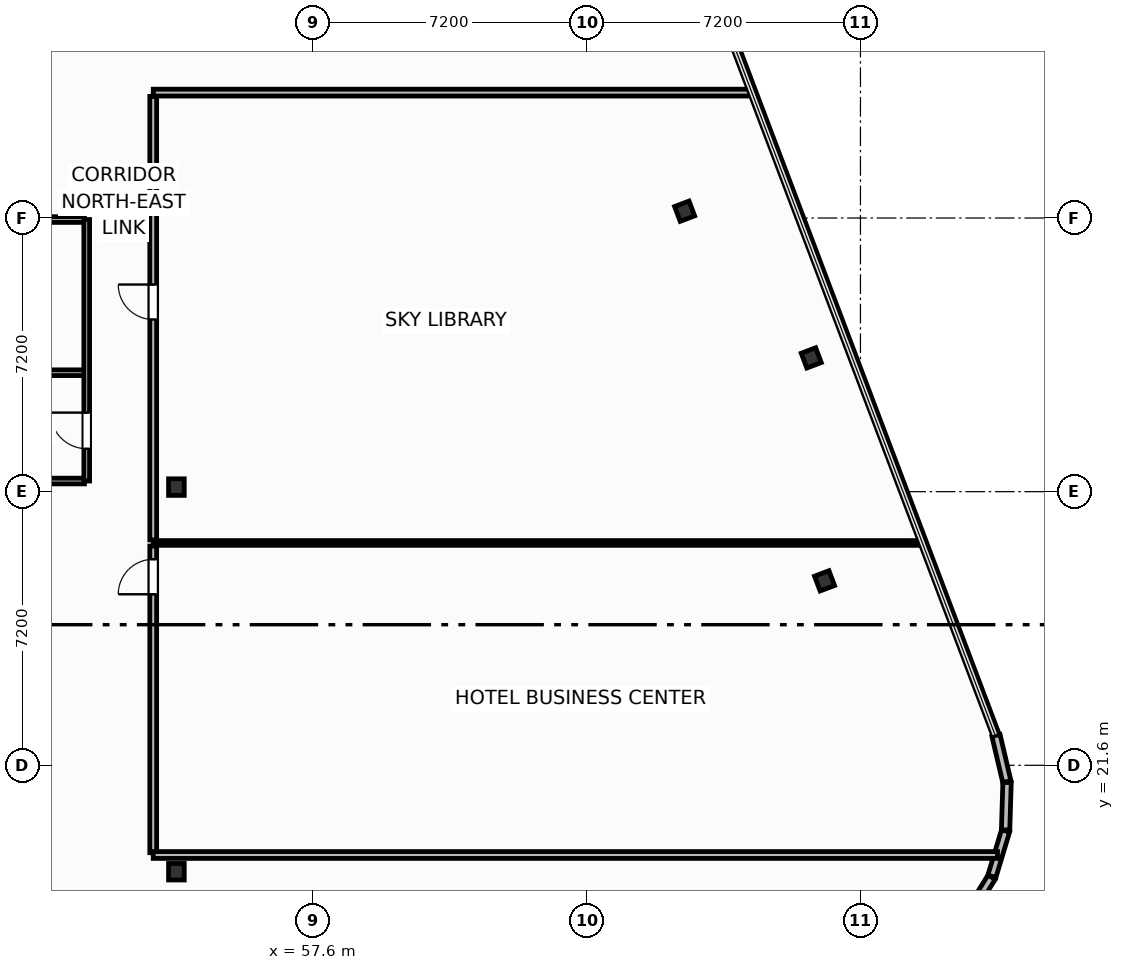
"""IFC4 building model, lengths in metres.
Left out: names, types, materials, properties, quantities, classifications, styles, units other than length and angle.
Written with IfcOpenShell. Run it as: python <this file> out.ifc"""

import sys

from ifc_helpers import new_model, si_unit, direction, frame, frame_2d, origin, origin_2d, place, context, subcontext, project, spatial, rectangle, i_section, extrude, element, fill, save


model = new_model("IFC4")
c1 = context("Model", 3, precision=1e-05, world=origin(), true_north=direction((0.0, 1.0)))
c2 = subcontext(c1, "Body", "Model", "MODEL_VIEW")
j1 = project(units=[si_unit("LENGTHUNIT", "METRE"), si_unit("PLANEANGLEUNIT", "RADIAN")], contexts=[c1])
p1 = place(None, origin())
s1 = spatial("IfcSite", under=j1, at=p1, CompositionType="ELEMENT")
p2 = place(p1, origin())
s2 = spatial("IfcBuilding", under=s1, at=p2, CompositionType="ELEMENT")
p3 = place(p2, frame((0.0, 0.0, 223.8)))
s3 = spatial("IfcBuildingStorey", under=s2, at=p3, CompositionType="ELEMENT", Elevation=223.8)
for number, where, z_axis, x_axis in (
    (1, (54.0, 18.8, 0.0), (0.0, 0.0, 1.0), (1.0, 0.0, 0.0)),
    (2, (54.0, 28.92, 0.0), (0.0, 0.0, 1.0), (1.0, 0.0, 0.0)),
):
    element("IfcColumn", number, at=place(p3, frame(where, z_axis=z_axis, x_axis=x_axis)), inside=s3, PredefinedType="COLUMN", context=c2, shape_type="SweptSolid", body=[
        extrude(i_section(OverallWidth=0.412, OverallDepth=0.435, WebThickness=0.036, FlangeThickness=0.057, FilletRadius=0.025, at=origin_2d()), origin(), (0.0, 0.0, 1.0), 3.7),
    ])
for number, where, z_axis, x_axis in (
    (3, (71.055, 26.453, 0.0), (0.0, 0.0, 1.0), (0.935, 0.354, 0.0)),
    (4, (70.706, 32.32, 0.0), (0.0, 0.0, 1.0), (0.935, 0.354, 0.0)),
    (5, (67.373, 36.18, 0.0), (0.0, 0.0, 1.0), (0.935, 0.354, 0.0)),
):
    element("IfcColumn", number, at=place(p3, frame(where, z_axis=z_axis, x_axis=x_axis)), inside=s3, PredefinedType="COLUMN", context=c2, shape_type="SweptSolid", body=[
        extrude(i_section(OverallWidth=0.406, OverallDepth=0.416, WebThickness=0.03, FlangeThickness=0.048, FilletRadius=0.025, at=origin_2d()), origin(), (0.0, 0.0, 1.0), 3.7),
    ])
for number, where, z_axis, x_axis in (
    (6, (74.794, 17.593, 0.0), (0.0, 0.0, 1.0), (0.527, 0.85, 0.0)),
    (7, (75.458, 18.679, 0.0), (0.0, 0.0, 1.0), (0.288, 0.958, 0.0)),
):
    element("IfcWall", number, at=place(p3, frame(where, z_axis=z_axis, x_axis=x_axis)), inside=s3, PredefinedType="SOLIDWALL", context=c2, shape_type="SweptSolid", body=[
        extrude(rectangle(XDim=1.249, YDim=0.22, at=frame_2d((0.624, 0.0))), origin(), (0.0, 0.0, 1.0), 2.73),
    ])
p4 = place(p3, frame((75.819, 19.899, 0.0), z_axis=(0.0, 0.0, 1.0), x_axis=(0.030898954628, 0.999522513305, 0.0)))
e8 = element("IfcWall", 8, at=p4, inside=s3, PredefinedType="SOLIDWALL", context=c2, shape_type="SweptSolid", body=[
    extrude(rectangle(XDim=1.248, YDim=0.22, at=frame_2d((0.624, 0.0))), origin(), (0.0, 0.0, 1.0), 2.73),
])
p5 = place(p3, frame((75.852, 21.172, 0.0), z_axis=(0.0, 0.0, 1.0), x_axis=(-0.228941257463, 0.973440239887, 0.0)))
e9 = element("IfcWall", 9, at=p5, inside=s3, PredefinedType="SOLIDWALL", context=c2, shape_type="SweptSolid", body=[
    extrude(rectangle(XDim=1.249, YDim=0.22, at=frame_2d((0.625, 0.0))), origin(), (0.0, 0.0, 1.0), 2.73),
])
p6 = place(p3, frame((53.39, 19.3, 0.0), z_axis=(0.0, 0.0, 1.0), x_axis=(0.0, 1.0, 0.0)))
e10 = element("IfcWall", 10, at=p6, inside=s3, PredefinedType="PARTITIONING", context=c2, shape_type="SweptSolid", body=[
    extrude(rectangle(XDim=8.07, YDim=0.18, at=frame_2d((4.035, 0.0))), origin(), (0.0, 0.0, 1.0), 3.45),
])
p7 = place(p6, frame((6.8, 0.0, 0.0)))
e11 = element("IfcOpeningElement", 11, at=p7, cuts=e10, PredefinedType="OPENING", context=c2, shape_type="SweptSolid", body=[
    extrude(rectangle(XDim=0.92, YDim=2.05, at=frame_2d((0.46, 1.025))), frame((0.0, 0.1, 0.0), z_axis=(0.0, -1.0, 0.0), x_axis=(1.0, 0.0, 0.0)), (0.0, 0.0, 1.0), 0.2),
])
p8 = place(p3, frame((53.39, 27.53, 0.0), z_axis=(0.0, 0.0, 1.0), x_axis=(0.0, 1.0, 0.0)))
e12 = element("IfcWall", 12, at=p8, inside=s3, PredefinedType="PARTITIONING", context=c2, shape_type="SweptSolid", body=[
    extrude(rectangle(XDim=11.67, YDim=0.18, at=frame_2d((5.835, 0.0))), origin(), (0.0, 0.0, 1.0), 3.45),
])
p9 = place(p8, frame((5.8, 0.0, 0.0)))
e13 = element("IfcOpeningElement", 13, at=p9, cuts=e12, PredefinedType="OPENING", context=c2, shape_type="SweptSolid", body=[
    extrude(rectangle(XDim=0.92, YDim=2.05, at=frame_2d((0.46, 1.025))), frame((0.0, 0.1, 0.0), z_axis=(0.0, -1.0, 0.0), x_axis=(1.0, 0.0, 0.0)), (0.0, 0.0, 1.0), 0.2),
])
p10 = place(p3, frame((53.39, 27.45, 0.0), z_axis=(0.0, 0.0, 1.0), x_axis=(1.0, 0.0, 0.0)))
e14 = element("IfcWall", 14, at=p10, inside=s3, PredefinedType="PARTITIONING", context=c2, shape_type="SweptSolid", body=[
    extrude(rectangle(XDim=20.199, YDim=0.125, at=frame_2d((10.1, 0.0))), origin(), (0.0, 0.0, 1.0), 2.739),
])
p11 = place(p3, frame((53.39, 19.24, 0.0), z_axis=(0.0, 0.0, 1.0), x_axis=(1.0, 0.0, 0.0)))
e15 = element("IfcWall", 15, at=p11, inside=s3, PredefinedType="PARTITIONING", context=c2, shape_type="SweptSolid", body=[
    extrude(rectangle(XDim=22.217, YDim=0.18, at=frame_2d((11.108, 0.0))), origin(), (0.0, 0.0, 1.0), 3.45),
])
p12 = place(p3, frame((53.39, 39.3, 0.0), z_axis=(0.0, 0.0, 1.0), x_axis=(1.0, 0.0, 0.0)))
e16 = element("IfcWall", 16, at=p12, inside=s3, PredefinedType="PARTITIONING", context=c2, shape_type="SweptSolid", body=[
    extrude(rectangle(XDim=15.713, YDim=0.18, at=frame_2d((7.856, 0.0))), origin(), (0.0, 0.0, 1.0), 3.45),
])
p13 = place(p3, frame((48.3, 31.93, 0.0), z_axis=(0.0, 0.0, 1.0), x_axis=(1.0, 0.0, 0.0)))
e17 = element("IfcWall", 17, at=p13, inside=s3, PredefinedType="PARTITIONING", context=c2, shape_type="SweptSolid", body=[
    extrude(rectangle(XDim=3.28, YDim=0.15, at=frame_2d((1.64, 0.0))), origin(), (0.0, 0.0, 1.0), 3.45),
])
p14 = place(p13, frame((1.15, 0.0, 0.0)))
e18 = element("IfcOpeningElement", 18, at=p14, cuts=e17, PredefinedType="OPENING", context=c2, shape_type="SweptSolid", body=[
    extrude(rectangle(XDim=0.95, YDim=2.05, at=frame_2d((0.475, 1.025))), frame((0.0, 0.085, 0.0), z_axis=(0.0, -1.0, 0.0), x_axis=(1.0, 0.0, 0.0)), (0.0, 0.0, 1.0), 0.17),
])
p15 = place(p3, frame((48.3, 29.08, 0.0), z_axis=(0.0, 0.0, 1.0), x_axis=(1.0, 0.0, 0.0)))
e19 = element("IfcWall", 19, at=p15, inside=s3, PredefinedType="PARTITIONING", context=c2, shape_type="SweptSolid", body=[
    extrude(rectangle(XDim=3.28, YDim=0.15, at=frame_2d((1.64, 0.0))), origin(), (0.0, 0.0, 1.0), 2.662),
])
p16 = place(p3, frame((48.3, 35.96, 0.0), z_axis=(0.0, 0.0, 1.0), x_axis=(1.0, 0.0, 0.0)))
e20 = element("IfcWall", 20, at=p16, inside=s3, PredefinedType="PARTITIONING", context=c2, shape_type="SweptSolid", body=[
    extrude(rectangle(XDim=3.28, YDim=0.15, at=frame_2d((1.64, 0.0))), origin(), (0.0, 0.0, 1.0), 3.45),
])
p17 = place(p3, frame((51.64, 29.08, 0.0), z_axis=(0.0, 0.0, 1.0), x_axis=(0.0, 1.0, 0.0)))
e21 = element("IfcWall", 21, at=p17, inside=s3, PredefinedType="PARTITIONING", context=c2, shape_type="SweptSolid", body=[
    extrude(rectangle(XDim=6.88, YDim=0.15, at=frame_2d((3.44, 0.0))), origin(), (0.0, 0.0, 1.0), 3.45),
])
p18 = place(p17, frame((0.85, 0.0, 0.0)))
e22 = element("IfcOpeningElement", 22, at=p18, cuts=e21, PredefinedType="OPENING", context=c2, shape_type="SweptSolid", body=[
    extrude(rectangle(XDim=0.95, YDim=2.05, at=frame_2d((0.475, 1.025))), frame((0.0, 0.085, 0.0), z_axis=(0.0, -1.0, 0.0), x_axis=(1.0, 0.0, 0.0)), (0.0, 0.0, 1.0), 0.17),
])
p19 = place(p7, origin())
e23 = element("IfcDoor", 23, at=p19, inside=s3, OperationType="SINGLE_SWING_LEFT", PredefinedType="DOOR", context=c2, shape_type="SweptSolid", body=[
    extrude(rectangle(XDim=0.92, YDim=2.05, at=frame_2d((0.46, 1.025))), frame((0.0, 0.025, 0.0), z_axis=(0.0, -1.0, 0.0), x_axis=(1.0, 0.0, 0.0)), (0.0, 0.0, 1.0), 0.05),
])
fill(e11, e23)
p20 = place(p9, origin())
e24 = element("IfcDoor", 24, at=p20, inside=s3, OperationType="SINGLE_SWING_RIGHT", PredefinedType="DOOR", context=c2, shape_type="SweptSolid", body=[
    extrude(rectangle(XDim=0.92, YDim=2.05, at=frame_2d((0.46, 1.025))), frame((0.0, 0.025, 0.0), z_axis=(0.0, -1.0, 0.0), x_axis=(1.0, 0.0, 0.0)), (0.0, 0.0, 1.0), 0.05),
])
fill(e13, e24)
p21 = place(p18, origin())
e25 = element("IfcDoor", 25, at=p21, inside=s3, OperationType="SINGLE_SWING_RIGHT", PredefinedType="DOOR", context=c2, shape_type="SweptSolid", body=[
    extrude(rectangle(XDim=0.95, YDim=2.05, at=frame_2d((0.475, 1.025))), frame((0.0, 0.025, 0.0), z_axis=(0.0, -1.0, 0.0), x_axis=(1.0, 0.0, 0.0)), (0.0, 0.0, 1.0), 0.05),
])
fill(e22, e25)
save(model, sys.argv[1])
